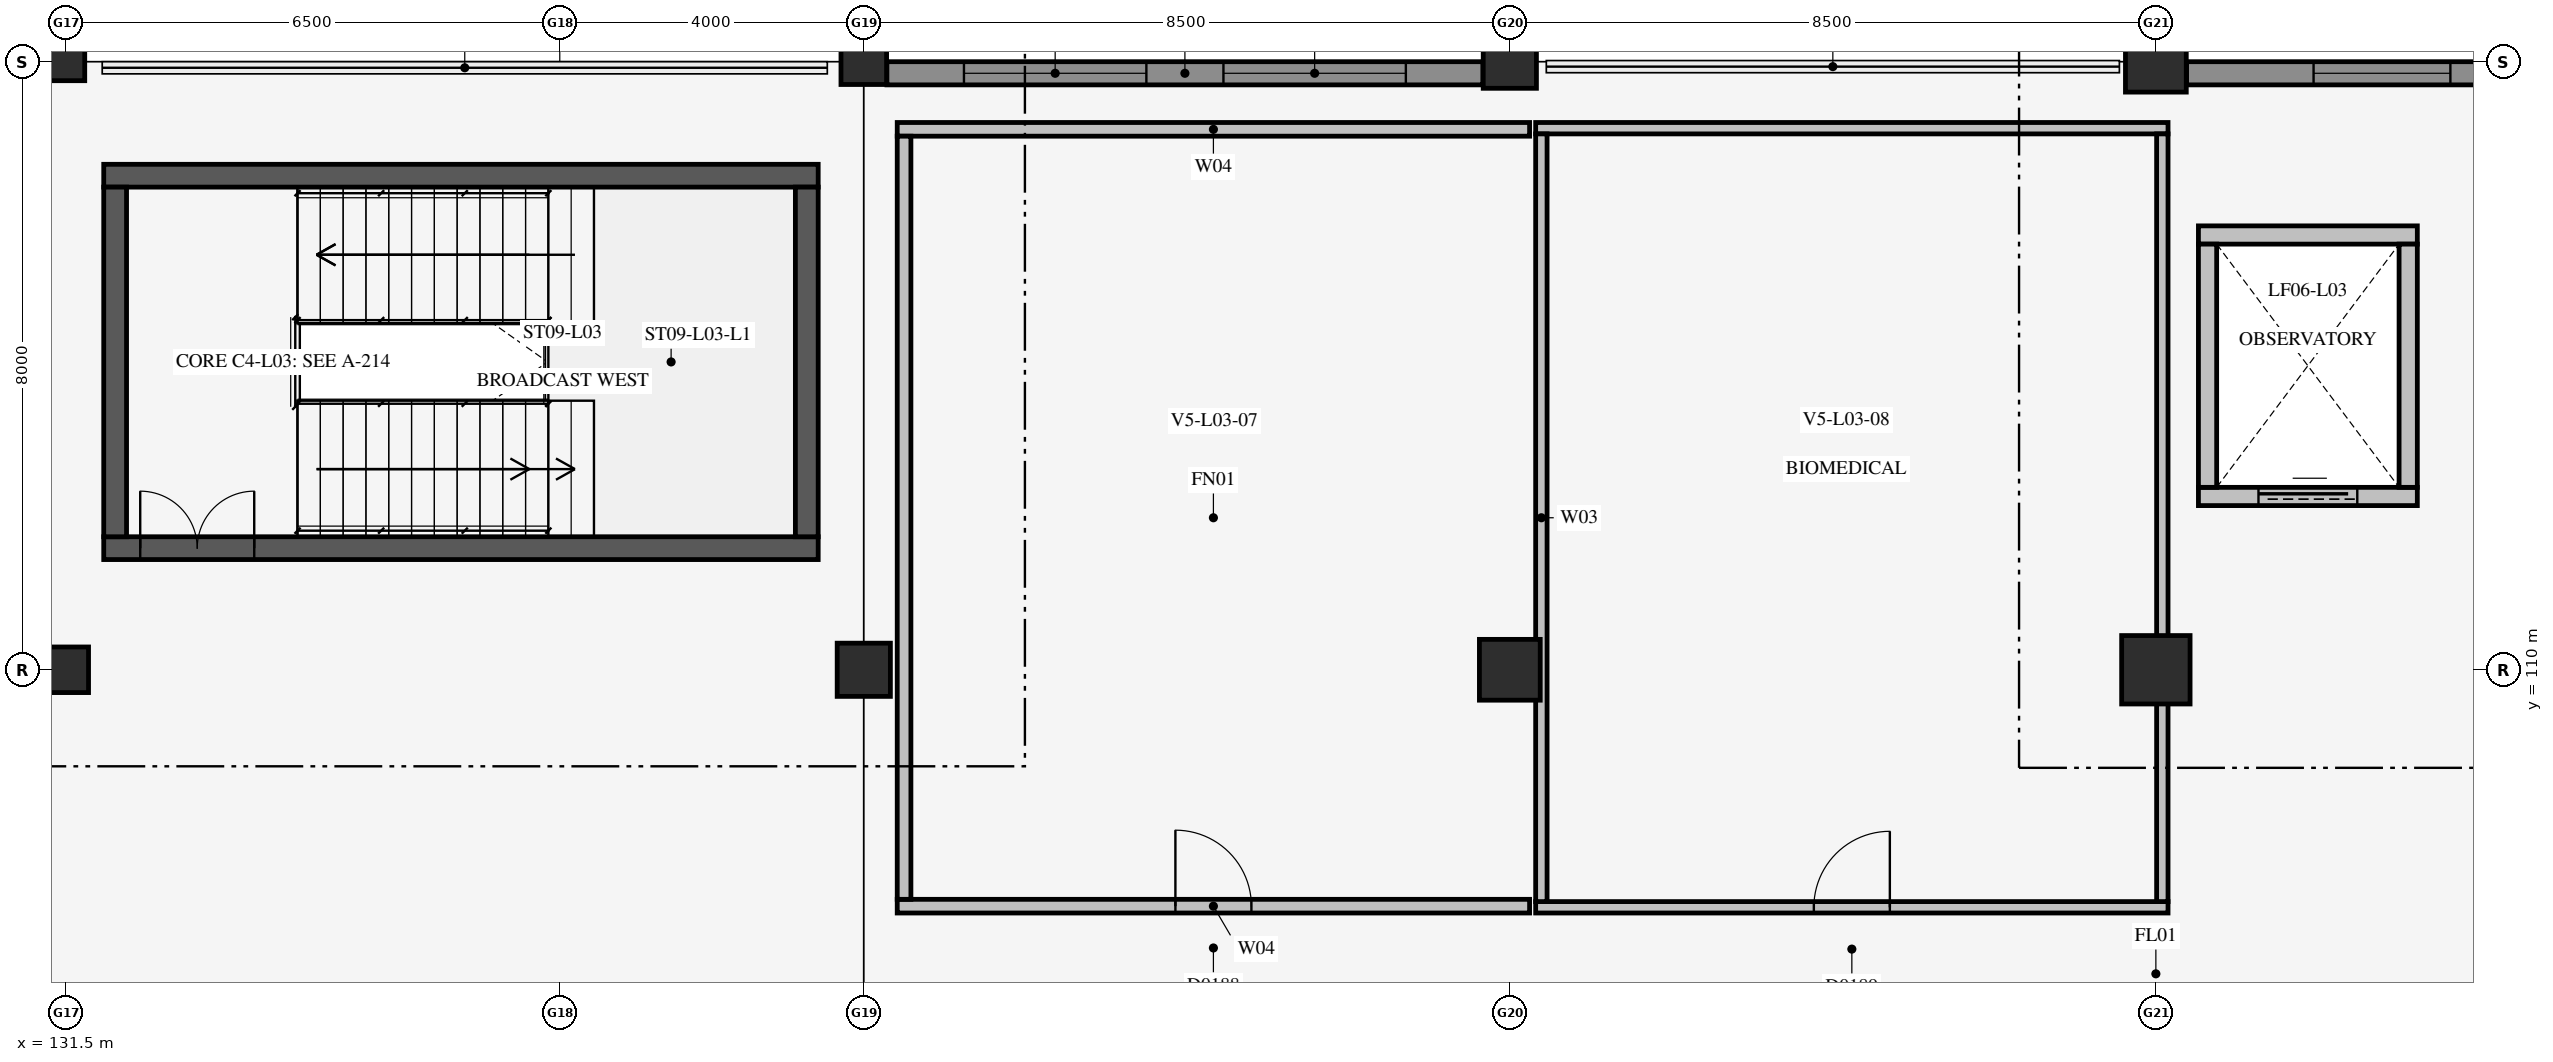
"""IFC4 building model, lengths in metres.
Left out: names, types, materials, properties, quantities, classifications, styles, units other than length and angle.
Written with IfcOpenShell. Run it as: python <this file> out.ifc"""

import sys

from ifc_helpers import new_model, si_unit, direction, frame, frame_2d, origin, origin_2d, place, context, subcontext, project, spatial, rectangle, extrude, element, fill, save


model = new_model("IFC4")
c1 = context("Model", 3, precision=1e-05, world=origin(), true_north=direction((0.0, 1.0)))
c2 = subcontext(c1, "Body", "Model", "MODEL_VIEW")
j1 = project(units=[si_unit("LENGTHUNIT", "METRE"), si_unit("PLANEANGLEUNIT", "RADIAN")], contexts=[c1])
p1 = place(None, origin())
s1 = spatial("IfcSite", under=j1, at=p1, CompositionType="ELEMENT")
p2 = place(p1, origin())
s2 = spatial("IfcBuilding", under=s1, at=p2, CompositionType="ELEMENT")
p3 = place(p2, frame((0.0, 0.0, 14.8)))
s3 = spatial("IfcBuildingStorey", under=s2, at=p3, CompositionType="ELEMENT", Elevation=14.8)
p4 = place(p3, frame((132.0, 111.6, 0.0), z_axis=(0.0, 0.0, 1.0), x_axis=(1.0, 0.0, 0.0)))
e1 = element("IfcWall", 1, at=p4, inside=s3, PredefinedType="SHEAR", context=c2, shape_type="SweptSolid", body=[
    extrude(rectangle(XDim=9.4, YDim=0.3, at=frame_2d((4.7, 0.0))), origin(), (0.0, 0.0, 1.0), 3.82),
])
p5 = place(p4, frame((0.48, 0.0, 0.0)))
e2 = element("IfcOpeningElement", 2, at=p5, cuts=e1, PredefinedType="OPENING", context=c2, shape_type="SweptSolid", body=[
    extrude(rectangle(XDim=1.5, YDim=2.3, at=frame_2d((0.75, 1.15))), frame((0.0, 0.162, 0.0), z_axis=(0.0, -1.0, 0.0), x_axis=(1.0, 0.0, 0.0)), (0.0, 0.0, 1.0), 0.324),
])
p6 = place(p3, frame((132.0, 116.5, 0.0), z_axis=(0.0, 0.0, 1.0), x_axis=(1.0, 0.0, 0.0)))
e3 = element("IfcWall", 3, at=p6, inside=s3, PredefinedType="SHEAR", context=c2, shape_type="SweptSolid", body=[
    extrude(rectangle(XDim=9.4, YDim=0.3, at=frame_2d((4.7, 0.0))), origin(), (0.0, 0.0, 1.0), 3.82),
])
for number, where, z_axis, x_axis in (
    (4, (132.15, 111.75, 0.0), (0.0, 0.0, 1.0), (0.0, 1.0, 0.0)),
    (5, (141.25, 111.75, 0.0), (0.0, 0.0, 1.0), (0.0, 1.0, 0.0)),
):
    element("IfcWall", number, at=place(p3, frame(where, z_axis=z_axis, x_axis=x_axis)), inside=s3, PredefinedType="SHEAR", context=c2, shape_type="SweptSolid", body=[
        extrude(rectangle(XDim=4.6, YDim=0.3, at=frame_2d((2.3, 0.0))), origin(), (0.0, 0.0, 1.0), 3.82),
    ])
p7 = place(p3, frame((159.56, 112.28, 0.0), z_axis=(0.0, 0.0, 1.0), x_axis=(1.0, 0.0, 0.0)))
e6 = element("IfcWall", 6, at=p7, inside=s3, PredefinedType="SOLIDWALL", context=c2, shape_type="SweptSolid", body=[
    extrude(rectangle(XDim=2.88, YDim=0.24, at=frame_2d((1.44, 0.0))), origin(), (0.0, 0.0, 1.0), 4.2),
])
p8 = place(p7, frame((0.79, 0.0, 0.0)))
e7 = element("IfcOpeningElement", 7, at=p8, cuts=e6, PredefinedType="OPENING", context=c2, shape_type="SweptSolid", body=[
    extrude(rectangle(XDim=1.3, YDim=2.25, at=frame_2d((0.65, 1.125))), frame((0.0, 0.132, 0.0), z_axis=(0.0, -1.0, 0.0), x_axis=(1.0, 0.0, 0.0)), (0.0, 0.0, 1.0), 0.264),
])
p9 = place(p3, frame((159.56, 115.72, 0.0), z_axis=(0.0, 0.0, 1.0), x_axis=(1.0, 0.0, 0.0)))
e8 = element("IfcWall", 8, at=p9, inside=s3, PredefinedType="SOLIDWALL", context=c2, shape_type="SweptSolid", body=[
    extrude(rectangle(XDim=2.88, YDim=0.24, at=frame_2d((1.44, 0.0))), origin(), (0.0, 0.0, 1.0), 4.2),
])
for number, where, z_axis, x_axis in (
    (9, (159.68, 112.4, 0.0), (0.0, 0.0, 1.0), (0.0, 1.0, 0.0)),
    (10, (162.32, 112.4, 0.0), (0.0, 0.0, 1.0), (0.0, 1.0, 0.0)),
):
    element("IfcWall", number, at=place(p3, frame(where, z_axis=z_axis, x_axis=x_axis)), inside=s3, PredefinedType="SOLIDWALL", context=c2, shape_type="SweptSolid", body=[
        extrude(rectangle(XDim=3.2, YDim=0.24, at=frame_2d((1.6, 0.0))), origin(), (0.0, 0.0, 1.0), 4.2),
    ])
p10 = place(p3, frame((131.5, 110.0, 0.0), z_axis=(0.0, 0.0, 1.0), x_axis=(1.0, 0.0, 0.0)))
e11 = element("IfcColumn", 11, at=p10, inside=s3, PredefinedType="COLUMN", context=c2, shape_type="SweptSolid", body=[
    extrude(rectangle(XDim=0.6, YDim=0.6, at=origin_2d()), origin(), (0.0, 0.0, 1.0), 4.2),
])
p11 = place(p3, frame((131.5, 118.0, 0.0), z_axis=(0.0, 0.0, 1.0), x_axis=(1.0, 0.0, 0.0)))
e12 = element("IfcColumn", 12, at=p11, inside=s3, PredefinedType="COLUMN", context=c2, shape_type="SweptSolid", body=[
    extrude(rectangle(XDim=0.5, YDim=0.5, at=origin_2d()), origin(), (0.0, 0.0, 1.0), 4.2),
])
p12 = place(p3, frame((142.0, 110.0, 0.0), z_axis=(0.0, 0.0, 1.0), x_axis=(1.0, 0.0, 0.0)))
e13 = element("IfcColumn", 13, at=p12, inside=s3, PredefinedType="COLUMN", context=c2, shape_type="SweptSolid", body=[
    extrude(rectangle(XDim=0.7, YDim=0.7, at=origin_2d()), origin(), (0.0, 0.0, 1.0), 4.2),
])
p13 = place(p3, frame((142.0, 118.0, 0.0), z_axis=(0.0, 0.0, 1.0), x_axis=(1.0, 0.0, 0.0)))
e14 = element("IfcColumn", 14, at=p13, inside=s3, PredefinedType="COLUMN", context=c2, shape_type="SweptSolid", body=[
    extrude(rectangle(XDim=0.6, YDim=0.6, at=origin_2d()), origin(), (0.0, 0.0, 1.0), 4.2),
])
p14 = place(p3, frame((150.5, 110.0, 0.0), z_axis=(0.0, 0.0, 1.0), x_axis=(1.0, 0.0, 0.0)))
e15 = element("IfcColumn", 15, at=p14, inside=s3, PredefinedType="COLUMN", context=c2, shape_type="SweptSolid", body=[
    extrude(rectangle(XDim=0.8, YDim=0.8, at=origin_2d()), origin(), (0.0, 0.0, 1.0), 4.2),
])
p15 = place(p3, frame((150.5, 118.0, 0.0), z_axis=(0.0, 0.0, 1.0), x_axis=(1.0, 0.0, 0.0)))
e16 = element("IfcColumn", 16, at=p15, inside=s3, PredefinedType="COLUMN", context=c2, shape_type="SweptSolid", body=[
    extrude(rectangle(XDim=0.7, YDim=0.7, at=origin_2d()), origin(), (0.0, 0.0, 1.0), 4.2),
])
p16 = place(p3, frame((159.0, 110.0, 0.0), z_axis=(0.0, 0.0, 1.0), x_axis=(1.0, 0.0, 0.0)))
e17 = element("IfcColumn", 17, at=p16, inside=s3, PredefinedType="COLUMN", context=c2, shape_type="SweptSolid", body=[
    extrude(rectangle(XDim=0.9, YDim=0.9, at=origin_2d()), origin(), (0.0, 0.0, 1.0), 4.2),
])
p17 = place(p3, frame((159.0, 118.0, 0.0), z_axis=(0.0, 0.0, 1.0), x_axis=(1.0, 0.0, 0.0)))
e18 = element("IfcColumn", 18, at=p17, inside=s3, PredefinedType="COLUMN", context=c2, shape_type="SweptSolid", body=[
    extrude(rectangle(XDim=0.8, YDim=0.8, at=origin_2d()), origin(), (0.0, 0.0, 1.0), 4.2),
])
p18 = place(p3, frame((142.44, 106.89, 0.0), z_axis=(0.0, 0.0, 1.0), x_axis=(1.0, 0.0, 0.0)))
e19 = element("IfcWall", 19, at=p18, inside=s3, PredefinedType="PARTITIONING", context=c2, shape_type="SweptSolid", body=[
    extrude(rectangle(XDim=8.32, YDim=0.18, at=frame_2d((4.16, 0.0))), origin(), (0.0, 0.0, 1.0), 3.805),
])
p19 = place(p18, frame((3.66, 0.0, 0.0)))
e20 = element("IfcOpeningElement", 20, at=p19, cuts=e19, PredefinedType="OPENING", context=c2, shape_type="SweptSolid", body=[
    extrude(rectangle(XDim=1.0, YDim=2.2, at=frame_2d((0.5, 1.1))), frame((0.0, 0.102, 0.0), z_axis=(0.0, -1.0, 0.0), x_axis=(1.0, 0.0, 0.0)), (0.0, 0.0, 1.0), 0.204),
])
p20 = place(p3, frame((142.44, 117.11, 0.0), z_axis=(0.0, 0.0, 1.0), x_axis=(1.0, 0.0, 0.0)))
e21 = element("IfcWall", 21, at=p20, inside=s3, PredefinedType="PARTITIONING", context=c2, shape_type="SweptSolid", body=[
    extrude(rectangle(XDim=8.32, YDim=0.18, at=frame_2d((4.16, 0.0))), origin(), (0.0, 0.0, 1.0), 3.805),
])
p21 = place(p3, frame((142.53, 106.98, 0.0), z_axis=(0.0, 0.0, 1.0), x_axis=(0.0, 1.0, 0.0)))
e22 = element("IfcWall", 22, at=p21, inside=s3, PredefinedType="PARTITIONING", context=c2, shape_type="SweptSolid", body=[
    extrude(rectangle(XDim=10.04, YDim=0.18, at=frame_2d((5.02, 0.0))), origin(), (0.0, 0.0, 1.0), 3.805),
])
p22 = place(p3, frame((150.84, 106.875, 0.0), z_axis=(0.0, 0.0, 1.0), x_axis=(1.0, 0.0, 0.0)))
e23 = element("IfcWall", 23, at=p22, inside=s3, PredefinedType="PARTITIONING", context=c2, shape_type="SweptSolid", body=[
    extrude(rectangle(XDim=8.32, YDim=0.15, at=frame_2d((4.16, 0.0))), origin(), (0.0, 0.0, 1.0), 3.805),
])
p23 = place(p22, frame((3.66, 0.0, 0.0)))
e24 = element("IfcOpeningElement", 24, at=p23, cuts=e23, PredefinedType="OPENING", context=c2, shape_type="SweptSolid", body=[
    extrude(rectangle(XDim=1.0, YDim=2.2, at=frame_2d((0.5, 1.1))), frame((0.0, 0.087, 0.0), z_axis=(0.0, -1.0, 0.0), x_axis=(1.0, 0.0, 0.0)), (0.0, 0.0, 1.0), 0.174),
])
p24 = place(p3, frame((150.84, 117.125, 0.0), z_axis=(0.0, 0.0, 1.0), x_axis=(1.0, 0.0, 0.0)))
e25 = element("IfcWall", 25, at=p24, inside=s3, PredefinedType="PARTITIONING", context=c2, shape_type="SweptSolid", body=[
    extrude(rectangle(XDim=8.32, YDim=0.15, at=frame_2d((4.16, 0.0))), origin(), (0.0, 0.0, 1.0), 3.805),
])
p25 = place(p3, frame((159.085, 106.95, 0.0), z_axis=(0.0, 0.0, 1.0), x_axis=(0.0, 1.0, 0.0)))
e26 = element("IfcWall", 26, at=p25, inside=s3, PredefinedType="PARTITIONING", context=c2, shape_type="SweptSolid", body=[
    extrude(rectangle(XDim=10.1, YDim=0.15, at=frame_2d((5.05, 0.0))), origin(), (0.0, 0.0, 1.0), 2.871),
])
p26 = place(p3, frame((150.915, 106.95, 0.0), z_axis=(0.0, 0.0, 1.0), x_axis=(0.0, 1.0, 0.0)))
e27 = element("IfcWall", 27, at=p26, inside=s3, PredefinedType="PARTITIONING", context=c2, shape_type="SweptSolid", body=[
    extrude(rectangle(XDim=10.1, YDim=0.15, at=frame_2d((5.05, 0.0))), origin(), (0.0, 0.0, 1.0), 3.805),
])
p27 = place(p3, frame((142.304, 117.847, 0.0), z_axis=(0.0, 0.0, 1.0), x_axis=(1.0, 0.0, 0.0)))
e28 = element("IfcWall", 28, at=p27, inside=s3, PredefinedType="SOLIDWALL", context=c2, shape_type="SweptSolid", body=[
    extrude(rectangle(XDim=7.842, YDim=0.305, at=frame_2d((3.921, 0.0))), origin(), (0.0, 0.0, 1.0), 3.377),
])
p28 = place(p27, frame((1.014, 0.0, 0.95)))
e29 = element("IfcOpeningElement", 29, at=p28, cuts=e28, PredefinedType="OPENING", context=c2, shape_type="SweptSolid", body=[
    extrude(rectangle(XDim=2.4, YDim=1.5, at=frame_2d((1.2, 0.75))), frame((0.0, 0.165, 0.0), z_axis=(0.0, -1.0, 0.0), x_axis=(1.0, 0.0, 0.0)), (0.0, 0.0, 1.0), 0.329),
])
p29 = place(p27, frame((4.428, 0.0, 0.95)))
e30 = element("IfcOpeningElement", 30, at=p29, cuts=e28, PredefinedType="OPENING", context=c2, shape_type="SweptSolid", body=[
    extrude(rectangle(XDim=2.4, YDim=1.5, at=frame_2d((1.2, 0.75))), frame((0.0, 0.165, 0.0), z_axis=(0.0, -1.0, 0.0), x_axis=(1.0, 0.0, 0.0)), (0.0, 0.0, 1.0), 0.329),
])
p30 = place(p3, frame((159.404, 117.847, 0.0), z_axis=(0.0, 0.0, 1.0), x_axis=(1.0, 0.0, 0.0)))
e31 = element("IfcWall", 31, at=p30, inside=s3, PredefinedType="SOLIDWALL", context=c2, shape_type="SweptSolid", body=[
    extrude(rectangle(XDim=5.142, YDim=0.305, at=frame_2d((2.571, 0.0))), origin(), (0.0, 0.0, 1.0), 3.254),
])
p31 = place(p30, frame((1.671, 0.0, 0.95)))
e32 = element("IfcOpeningElement", 32, at=p31, cuts=e31, PredefinedType="OPENING", context=c2, shape_type="SweptSolid", body=[
    extrude(rectangle(XDim=1.8, YDim=1.8, at=frame_2d((0.9, 0.9))), frame((0.0, 0.165, 0.0), z_axis=(0.0, -1.0, 0.0), x_axis=(1.0, 0.0, 0.0)), (0.0, 0.0, 1.0), 0.329),
])
p32 = place(p5, origin())
e33 = element("IfcDoor", 33, at=p32, inside=s3, OperationType="DOUBLE_DOOR_SINGLE_SWING", PredefinedType="DOOR", context=c2, shape_type="SweptSolid", body=[
    extrude(rectangle(XDim=1.5, YDim=2.3, at=frame_2d((0.75, 1.15))), frame((0.0, 0.025, 0.0), z_axis=(0.0, -1.0, 0.0), x_axis=(1.0, 0.0, 0.0)), (0.0, 0.0, 1.0), 0.05),
])
fill(e2, e33)
p33 = place(p19, origin())
e34 = element("IfcDoor", 34, at=p33, inside=s3, OperationType="SINGLE_SWING_LEFT", PredefinedType="DOOR", context=c2, shape_type="SweptSolid", body=[
    extrude(rectangle(XDim=1.0, YDim=2.2, at=frame_2d((0.5, 1.1))), frame((0.0, 0.025, 0.0), z_axis=(0.0, -1.0, 0.0), x_axis=(1.0, 0.0, 0.0)), (0.0, 0.0, 1.0), 0.05),
])
fill(e20, e34)
p34 = place(p23, origin())
e35 = element("IfcDoor", 35, at=p34, inside=s3, OperationType="SINGLE_SWING_RIGHT", PredefinedType="DOOR", context=c2, shape_type="SweptSolid", body=[
    extrude(rectangle(XDim=1.0, YDim=2.2, at=frame_2d((0.5, 1.1))), frame((0.0, 0.025, 0.0), z_axis=(0.0, -1.0, 0.0), x_axis=(1.0, 0.0, 0.0)), (0.0, 0.0, 1.0), 0.05),
])
fill(e24, e35)
p35 = place(p28, origin())
e36 = element("IfcWindow", 36, at=p35, inside=s3, PartitioningType="SINGLE_PANEL", PredefinedType="WINDOW", context=c2, shape_type="SweptSolid", body=[
    extrude(rectangle(XDim=2.4, YDim=1.5, at=frame_2d((1.2, 0.75))), frame((0.0, 0.03, 0.0), z_axis=(0.0, -1.0, 0.0), x_axis=(1.0, 0.0, 0.0)), (0.0, 0.0, 1.0), 0.06),
])
fill(e29, e36)
p36 = place(p29, origin())
e37 = element("IfcWindow", 37, at=p36, inside=s3, PartitioningType="SINGLE_PANEL", PredefinedType="WINDOW", context=c2, shape_type="SweptSolid", body=[
    extrude(rectangle(XDim=2.4, YDim=1.5, at=frame_2d((1.2, 0.75))), frame((0.0, 0.03, 0.0), z_axis=(0.0, -1.0, 0.0), x_axis=(1.0, 0.0, 0.0)), (0.0, 0.0, 1.0), 0.06),
])
fill(e30, e37)
p37 = place(p31, origin())
e38 = element("IfcWindow", 38, at=p37, inside=s3, PartitioningType="SINGLE_PANEL", PredefinedType="WINDOW", context=c2, shape_type="SweptSolid", body=[
    extrude(rectangle(XDim=1.8, YDim=1.8, at=frame_2d((0.9, 0.9))), frame((0.0, 0.03, 0.0), z_axis=(0.0, -1.0, 0.0), x_axis=(1.0, 0.0, 0.0)), (0.0, 0.0, 1.0), 0.06),
])
fill(e32, e38)
p38 = place(p8, origin())
e39 = element("IfcDoor", 39, at=p38, inside=s3, OperationType="SLIDING_TO_RIGHT", PredefinedType="USERDEFINED", context=c2, shape_type="SweptSolid", body=[
    extrude(rectangle(XDim=1.3, YDim=2.25, at=frame_2d((0.65, 1.125))), frame((0.0, 0.025, 0.0), z_axis=(0.0, -1.0, 0.0), x_axis=(1.0, 0.0, 0.0)), (0.0, 0.0, 1.0), 0.05),
])
fill(e7, e39)
save(model, sys.argv[1])
